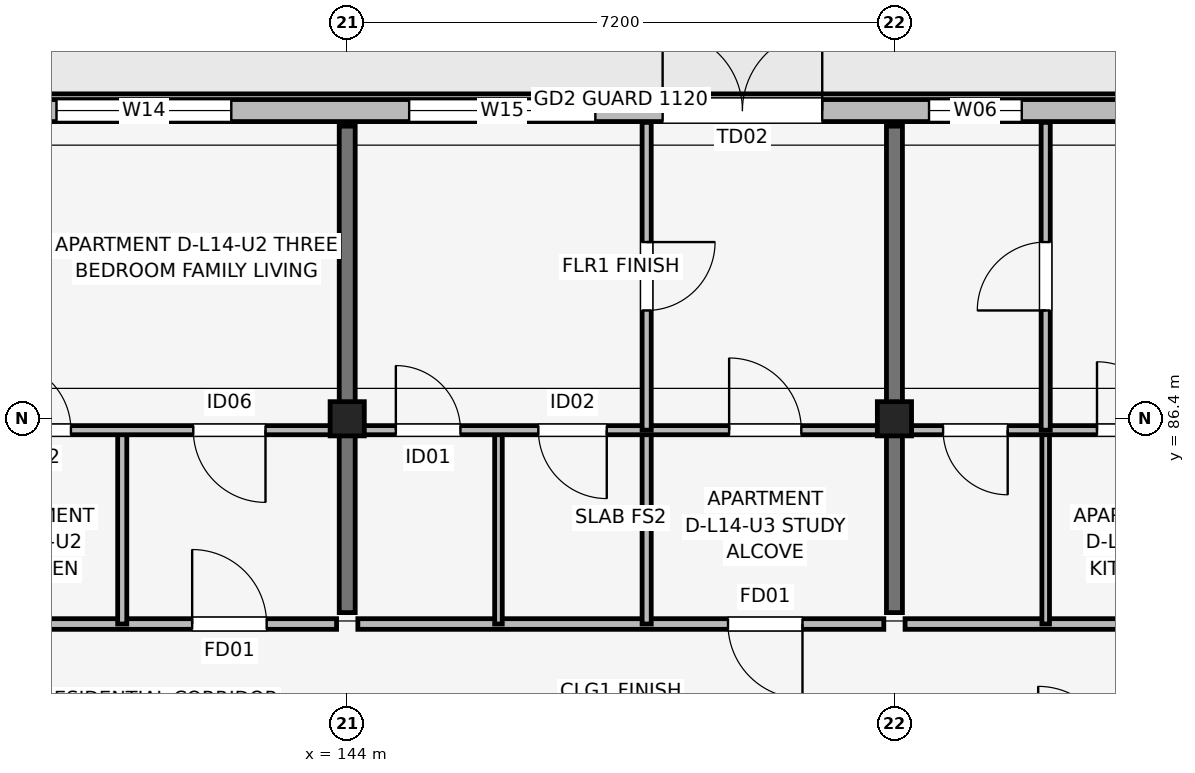
"""IFC4 building model, lengths in metres.
Left out: names, types, materials, properties, quantities, classifications, styles, units other than length and angle.
Written with IfcOpenShell. Run it as: python <this file> out.ifc"""

import sys

from ifc_helpers import new_model, si_unit, direction, frame, frame_2d, origin, origin_2d, place, context, subcontext, project, spatial, rectangle, extrude, element, fill, save


model = new_model("IFC4")
c1 = context("Model", 3, precision=1e-05, world=origin(), true_north=direction((0.0, 1.0)))
c2 = subcontext(c1, "Body", "Model", "MODEL_VIEW")
j1 = project(units=[si_unit("LENGTHUNIT", "METRE"), si_unit("PLANEANGLEUNIT", "RADIAN")], contexts=[c1])
p1 = place(None, origin())
s1 = spatial("IfcSite", under=j1, at=p1, CompositionType="ELEMENT")
p2 = place(p1, origin())
s2 = spatial("IfcBuilding", under=s1, at=p2, CompositionType="ELEMENT")
p3 = place(p2, frame((0.0, 0.0, 46.5)))
s3 = spatial("IfcBuildingStorey", under=s2, at=p3, CompositionType="ELEMENT", Elevation=46.5)
for number, where, z_axis, x_axis in (
    (1, (144.0, 86.4, 0.0), (0.0, 0.0, 1.0), (1.0, 0.0, 0.0)),
    (2, (151.2, 86.4, 0.0), (0.0, 0.0, 1.0), (1.0, 0.0, 0.0)),
):
    element("IfcColumn", number, at=place(p3, frame(where, z_axis=z_axis, x_axis=x_axis)), inside=s3, PredefinedType="COLUMN", context=c2, shape_type="SweptSolid", body=[
        extrude(rectangle(XDim=0.45, YDim=0.45, at=origin_2d()), origin(), (0.0, 0.0, 1.0), 3.15),
    ])
for number, where, z_axis, x_axis in (
    (3, (144.0, 83.85, 0.0), (0.0, 0.0, 1.0), (0.0, 1.0, 0.0)),
    (4, (151.2, 83.85, 0.0), (0.0, 0.0, 1.0), (0.0, 1.0, 0.0)),
):
    element("IfcWall", number, at=place(p3, frame(where, z_axis=z_axis, x_axis=x_axis)), inside=s3, PredefinedType="SHEAR", context=c2, shape_type="SweptSolid", body=[
        extrude(rectangle(XDim=6.4, YDim=0.21, at=frame_2d((3.2, 0.0))), origin(), (0.0, 0.0, 1.0), 3.15),
    ])
p4 = place(p3, frame((163.6, 90.455, 0.0), z_axis=(0.0, 0.0, 1.0), x_axis=(-1.0, 0.0, 0.0)))
e5 = element("IfcWall", 5, at=p4, inside=s3, PredefinedType="SOLIDWALL", context=c2, shape_type="SweptSolid", body=[
    extrude(rectangle(XDim=32.0, YDim=0.29, at=frame_2d((16.0, 0.0))), origin(), (0.0, 0.0, 1.0), 2.48),
])
p5 = place(p4, frame((15.45, 0.0, 0.0), z_axis=(0.0, 0.0, 1.0), x_axis=(-1.0, 0.0, 0.0)))
e6 = element("IfcOpeningElement", 6, at=p5, cuts=e5, PredefinedType="OPENING", context=c2, shape_type="SweptSolid", body=[
    extrude(rectangle(XDim=2.1, YDim=2.2, at=frame_2d((1.05, 1.1))), frame((0.0, 0.155, 0.0), z_axis=(0.0, -1.0, 0.0), x_axis=(1.0, 0.0, 0.0)), (0.0, 0.0, 1.0), 0.31),
])
p6 = place(p4, frame((29.285, 0.0, 0.7)))
e7 = element("IfcOpeningElement", 7, at=p6, cuts=e5, PredefinedType="OPENING", context=c2, shape_type="SweptSolid", body=[
    extrude(rectangle(XDim=1.86, YDim=1.6, at=frame_2d((0.93, 0.8))), frame((0.0, 0.155, 0.0), z_axis=(0.0, -1.0, 0.0), x_axis=(1.0, 0.0, 0.0)), (0.0, 0.0, 1.0), 0.31),
])
p7 = place(p4, frame((27.405, 0.0, 0.75)))
e8 = element("IfcOpeningElement", 8, at=p7, cuts=e5, PredefinedType="OPENING", context=c2, shape_type="SweptSolid", body=[
    extrude(rectangle(XDim=0.72, YDim=1.35, at=frame_2d((0.36, 0.675))), frame((0.0, 0.155, 0.0), z_axis=(0.0, -1.0, 0.0), x_axis=(1.0, 0.0, 0.0)), (0.0, 0.0, 1.0), 0.31),
])
p8 = place(p4, frame((25.31, 0.0, 0.75)))
e9 = element("IfcOpeningElement", 9, at=p8, cuts=e5, PredefinedType="OPENING", context=c2, shape_type="SweptSolid", body=[
    extrude(rectangle(XDim=0.85, YDim=1.4, at=frame_2d((0.425, 0.7))), frame((0.0, 0.155, 0.0), z_axis=(0.0, -1.0, 0.0), x_axis=(1.0, 0.0, 0.0)), (0.0, 0.0, 1.0), 0.31),
])
p9 = place(p4, frame((21.125, 0.0, 0.7)))
e10 = element("IfcOpeningElement", 10, at=p9, cuts=e5, PredefinedType="OPENING", context=c2, shape_type="SweptSolid", body=[
    extrude(rectangle(XDim=2.3, YDim=1.65, at=frame_2d((1.15, 0.825))), frame((0.0, 0.155, 0.0), z_axis=(0.0, -1.0, 0.0), x_axis=(1.0, 0.0, 0.0)), (0.0, 0.0, 1.0), 0.31),
])
p10 = place(p4, frame((16.335, 0.0, 0.7)))
e11 = element("IfcOpeningElement", 11, at=p10, cuts=e5, PredefinedType="OPENING", context=c2, shape_type="SweptSolid", body=[
    extrude(rectangle(XDim=2.45, YDim=1.65, at=frame_2d((1.225, 0.825))), frame((0.0, 0.155, 0.0), z_axis=(0.0, -1.0, 0.0), x_axis=(1.0, 0.0, 0.0)), (0.0, 0.0, 1.0), 0.31),
])
p11 = place(p4, frame((10.725, 0.0, 0.75)))
e12 = element("IfcOpeningElement", 12, at=p11, cuts=e5, PredefinedType="OPENING", context=c2, shape_type="SweptSolid", body=[
    extrude(rectangle(XDim=1.22, YDim=1.5, at=frame_2d((0.61, 0.75))), frame((0.0, 0.155, 0.0), z_axis=(0.0, -1.0, 0.0), x_axis=(1.0, 0.0, 0.0)), (0.0, 0.0, 1.0), 0.31),
])
p12 = place(p4, frame((7.015, 0.0, 0.7)))
e13 = element("IfcOpeningElement", 13, at=p12, cuts=e5, PredefinedType="OPENING", context=c2, shape_type="SweptSolid", body=[
    extrude(rectangle(XDim=1.72, YDim=1.6, at=frame_2d((0.86, 0.8))), frame((0.0, 0.155, 0.0), z_axis=(0.0, -1.0, 0.0), x_axis=(1.0, 0.0, 0.0)), (0.0, 0.0, 1.0), 0.31),
])
p13 = place(p4, frame((3.375, 0.0, 0.75)))
e14 = element("IfcOpeningElement", 14, at=p13, cuts=e5, PredefinedType="OPENING", context=c2, shape_type="SweptSolid", body=[
    extrude(rectangle(XDim=1.46, YDim=1.55, at=frame_2d((0.73, 0.775))), frame((0.0, 0.155, 0.0), z_axis=(0.0, -1.0, 0.0), x_axis=(1.0, 0.0, 0.0)), (0.0, 0.0, 1.0), 0.31),
])
p14 = place(p4, frame((1.355, 0.0, 0.75)))
e15 = element("IfcOpeningElement", 15, at=p14, cuts=e5, PredefinedType="OPENING", context=c2, shape_type="SweptSolid", body=[
    extrude(rectangle(XDim=0.6, YDim=1.25, at=frame_2d((0.3, 0.625))), frame((0.0, 0.155, 0.0), z_axis=(0.0, -1.0, 0.0), x_axis=(1.0, 0.0, 0.0)), (0.0, 0.0, 1.0), 0.31),
])
p15 = place(p3, frame((136.94, 83.7, 0.0), z_axis=(0.0, 0.0, 1.0), x_axis=(1.0, 0.0, 0.0)))
e16 = element("IfcWall", 16, at=p15, inside=s3, PredefinedType="PARTITIONING", context=c2, shape_type="SweptSolid", body=[
    extrude(rectangle(XDim=6.92, YDim=0.14, at=frame_2d((3.46, 0.0))), origin(), (0.0, 0.0, 1.0), 2.38),
])
p16 = place(p15, frame((5.02, 0.0, 0.0)))
e17 = element("IfcOpeningElement", 17, at=p16, cuts=e16, PredefinedType="OPENING", context=c2, shape_type="SweptSolid", body=[
    extrude(rectangle(XDim=0.98, YDim=2.1, at=frame_2d((0.49, 1.05))), frame((0.0, 0.08, 0.0), z_axis=(0.0, -1.0, 0.0), x_axis=(1.0, 0.0, 0.0)), (0.0, 0.0, 1.0), 0.16),
])
p17 = place(p3, frame((141.04, 83.7, 0.0), z_axis=(0.0, 0.0, 1.0), x_axis=(0.0, 1.0, 0.0)))
e18 = element("IfcWall", 18, at=p17, inside=s3, PredefinedType="PARTITIONING", context=c2, shape_type="SweptSolid", body=[
    extrude(rectangle(XDim=2.55, YDim=0.12, at=frame_2d((1.275, 0.0))), origin(), (0.0, 0.0, 1.0), 2.38),
])
p18 = place(p3, frame((136.94, 86.25, 0.0), z_axis=(0.0, 0.0, 1.0), x_axis=(1.0, 0.0, 0.0)))
e19 = element("IfcWall", 19, at=p18, inside=s3, PredefinedType="PARTITIONING", context=c2, shape_type="SweptSolid", body=[
    extrude(rectangle(XDim=6.92, YDim=0.12, at=frame_2d((3.46, 0.0))), origin(), (0.0, 0.0, 1.0), 2.38),
])
p19 = place(p18, frame((1.35, 0.0, 0.0), z_axis=(0.0, 0.0, 1.0), x_axis=(-1.0, 0.0, 0.0)))
e20 = element("IfcOpeningElement", 20, at=p19, cuts=e19, PredefinedType="OPENING", context=c2, shape_type="SweptSolid", body=[
    extrude(rectangle(XDim=0.85, YDim=2.08, at=frame_2d((0.425, 1.04))), frame((0.0, 0.07, 0.0), z_axis=(0.0, -1.0, 0.0), x_axis=(1.0, 0.0, 0.0)), (0.0, 0.0, 1.0), 0.14),
])
p20 = place(p18, frame((2.525, 0.0, 0.0)))
e21 = element("IfcOpeningElement", 21, at=p20, cuts=e19, PredefinedType="OPENING", context=c2, shape_type="SweptSolid", body=[
    extrude(rectangle(XDim=0.9, YDim=2.08, at=frame_2d((0.45, 1.04))), frame((0.0, 0.07, 0.0), z_axis=(0.0, -1.0, 0.0), x_axis=(1.0, 0.0, 0.0)), (0.0, 0.0, 1.0), 0.14),
])
p21 = place(p18, frame((5.985, 0.0, 0.0), z_axis=(0.0, 0.0, 1.0), x_axis=(-1.0, 0.0, 0.0)))
e22 = element("IfcOpeningElement", 22, at=p21, cuts=e19, PredefinedType="OPENING", context=c2, shape_type="SweptSolid", body=[
    extrude(rectangle(XDim=0.95, YDim=2.08, at=frame_2d((0.475, 1.04))), frame((0.0, 0.07, 0.0), z_axis=(0.0, -1.0, 0.0), x_axis=(1.0, 0.0, 0.0)), (0.0, 0.0, 1.0), 0.14),
])
p22 = place(p3, frame((144.14, 83.7, 0.0), z_axis=(0.0, 0.0, 1.0), x_axis=(1.0, 0.0, 0.0)))
e23 = element("IfcWall", 23, at=p22, inside=s3, PredefinedType="PARTITIONING", context=c2, shape_type="SweptSolid", body=[
    extrude(rectangle(XDim=6.92, YDim=0.14, at=frame_2d((3.46, 0.0))), origin(), (0.0, 0.0, 1.0), 2.38),
])
p23 = place(p22, frame((5.85, 0.0, 0.0), z_axis=(0.0, 0.0, 1.0), x_axis=(-1.0, 0.0, 0.0)))
e24 = element("IfcOpeningElement", 24, at=p23, cuts=e23, PredefinedType="OPENING", context=c2, shape_type="SweptSolid", body=[
    extrude(rectangle(XDim=0.98, YDim=2.1, at=frame_2d((0.49, 1.05))), frame((0.0, 0.08, 0.0), z_axis=(0.0, -1.0, 0.0), x_axis=(1.0, 0.0, 0.0)), (0.0, 0.0, 1.0), 0.16),
])
p24 = place(p3, frame((145.99, 83.7, 0.0), z_axis=(0.0, 0.0, 1.0), x_axis=(0.0, 1.0, 0.0)))
e25 = element("IfcWall", 25, at=p24, inside=s3, PredefinedType="PARTITIONING", context=c2, shape_type="SweptSolid", body=[
    extrude(rectangle(XDim=2.55, YDim=0.1, at=frame_2d((1.275, 0.0))), origin(), (0.0, 0.0, 1.0), 2.38),
])
p25 = place(p3, frame((147.94, 83.7, 0.0), z_axis=(0.0, 0.0, 1.0), x_axis=(0.0, 1.0, 0.0)))
e26 = element("IfcWall", 26, at=p25, inside=s3, PredefinedType="PARTITIONING", context=c2, shape_type="SweptSolid", body=[
    extrude(rectangle(XDim=2.55, YDim=0.12, at=frame_2d((1.275, 0.0))), origin(), (0.0, 0.0, 1.0), 2.38),
])
p26 = place(p3, frame((144.14, 86.25, 0.0), z_axis=(0.0, 0.0, 1.0), x_axis=(1.0, 0.0, 0.0)))
e27 = element("IfcWall", 27, at=p26, inside=s3, PredefinedType="PARTITIONING", context=c2, shape_type="SweptSolid", body=[
    extrude(rectangle(XDim=6.92, YDim=0.12, at=frame_2d((3.46, 0.0))), origin(), (0.0, 0.0, 1.0), 2.38),
])
p27 = place(p26, frame((0.5, 0.0, 0.0)))
e28 = element("IfcOpeningElement", 28, at=p27, cuts=e27, PredefinedType="OPENING", context=c2, shape_type="SweptSolid", body=[
    extrude(rectangle(XDim=0.85, YDim=2.08, at=frame_2d((0.425, 1.04))), frame((0.0, 0.07, 0.0), z_axis=(0.0, -1.0, 0.0), x_axis=(1.0, 0.0, 0.0)), (0.0, 0.0, 1.0), 0.14),
])
p28 = place(p26, frame((3.275, 0.0, 0.0), z_axis=(0.0, 0.0, 1.0), x_axis=(-1.0, 0.0, 0.0)))
e29 = element("IfcOpeningElement", 29, at=p28, cuts=e27, PredefinedType="OPENING", context=c2, shape_type="SweptSolid", body=[
    extrude(rectangle(XDim=0.9, YDim=2.08, at=frame_2d((0.45, 1.04))), frame((0.0, 0.07, 0.0), z_axis=(0.0, -1.0, 0.0), x_axis=(1.0, 0.0, 0.0)), (0.0, 0.0, 1.0), 0.14),
])
p29 = place(p26, frame((4.885, 0.0, 0.0)))
e30 = element("IfcOpeningElement", 30, at=p29, cuts=e27, PredefinedType="OPENING", context=c2, shape_type="SweptSolid", body=[
    extrude(rectangle(XDim=0.95, YDim=2.08, at=frame_2d((0.475, 1.04))), frame((0.0, 0.07, 0.0), z_axis=(0.0, -1.0, 0.0), x_axis=(1.0, 0.0, 0.0)), (0.0, 0.0, 1.0), 0.14),
])
p30 = place(p3, frame((147.94, 86.25, 0.0), z_axis=(0.0, 0.0, 1.0), x_axis=(0.0, 1.0, 0.0)))
e31 = element("IfcWall", 31, at=p30, inside=s3, PredefinedType="PARTITIONING", context=c2, shape_type="SweptSolid", body=[
    extrude(rectangle(XDim=4.05, YDim=0.12, at=frame_2d((2.025, 0.0))), origin(), (0.0, 0.0, 1.0), 2.38),
])
p31 = place(p30, frame((2.475, 0.0, 0.0), z_axis=(0.0, 0.0, 1.0), x_axis=(-1.0, 0.0, 0.0)))
e32 = element("IfcOpeningElement", 32, at=p31, cuts=e31, PredefinedType="OPENING", context=c2, shape_type="SweptSolid", body=[
    extrude(rectangle(XDim=0.9, YDim=2.08, at=frame_2d((0.45, 1.04))), frame((0.0, 0.07, 0.0), z_axis=(0.0, -1.0, 0.0), x_axis=(1.0, 0.0, 0.0)), (0.0, 0.0, 1.0), 0.14),
])
p32 = place(p3, frame((151.34, 83.7, 0.0), z_axis=(0.0, 0.0, 1.0), x_axis=(1.0, 0.0, 0.0)))
e33 = element("IfcWall", 33, at=p32, inside=s3, PredefinedType="PARTITIONING", context=c2, shape_type="SweptSolid", body=[
    extrude(rectangle(XDim=6.92, YDim=0.14, at=frame_2d((3.46, 0.0))), origin(), (0.0, 0.0, 1.0), 2.38),
])
p33 = place(p32, frame((5.02, 0.0, 0.0)))
e34 = element("IfcOpeningElement", 34, at=p33, cuts=e33, PredefinedType="OPENING", context=c2, shape_type="SweptSolid", body=[
    extrude(rectangle(XDim=0.98, YDim=2.1, at=frame_2d((0.49, 1.05))), frame((0.0, 0.08, 0.0), z_axis=(0.0, -1.0, 0.0), x_axis=(1.0, 0.0, 0.0)), (0.0, 0.0, 1.0), 0.16),
])
p34 = place(p3, frame((153.19, 83.7, 0.0), z_axis=(0.0, 0.0, 1.0), x_axis=(0.0, 1.0, 0.0)))
e35 = element("IfcWall", 35, at=p34, inside=s3, PredefinedType="PARTITIONING", context=c2, shape_type="SweptSolid", body=[
    extrude(rectangle(XDim=2.55, YDim=0.1, at=frame_2d((1.275, 0.0))), origin(), (0.0, 0.0, 1.0), 2.38),
])
p35 = place(p3, frame((151.34, 86.25, 0.0), z_axis=(0.0, 0.0, 1.0), x_axis=(1.0, 0.0, 0.0)))
e36 = element("IfcWall", 36, at=p35, inside=s3, PredefinedType="PARTITIONING", context=c2, shape_type="SweptSolid", body=[
    extrude(rectangle(XDim=6.92, YDim=0.12, at=frame_2d((3.46, 0.0))), origin(), (0.0, 0.0, 1.0), 2.38),
])
p36 = place(p35, frame((1.35, 0.0, 0.0), z_axis=(0.0, 0.0, 1.0), x_axis=(-1.0, 0.0, 0.0)))
e37 = element("IfcOpeningElement", 37, at=p36, cuts=e36, PredefinedType="OPENING", context=c2, shape_type="SweptSolid", body=[
    extrude(rectangle(XDim=0.85, YDim=2.08, at=frame_2d((0.425, 1.04))), frame((0.0, 0.07, 0.0), z_axis=(0.0, -1.0, 0.0), x_axis=(1.0, 0.0, 0.0)), (0.0, 0.0, 1.0), 0.14),
])
p37 = place(p35, frame((2.525, 0.0, 0.0)))
e38 = element("IfcOpeningElement", 38, at=p37, cuts=e36, PredefinedType="OPENING", context=c2, shape_type="SweptSolid", body=[
    extrude(rectangle(XDim=0.9, YDim=2.08, at=frame_2d((0.45, 1.04))), frame((0.0, 0.07, 0.0), z_axis=(0.0, -1.0, 0.0), x_axis=(1.0, 0.0, 0.0)), (0.0, 0.0, 1.0), 0.14),
])
p38 = place(p35, frame((5.985, 0.0, 0.0), z_axis=(0.0, 0.0, 1.0), x_axis=(-1.0, 0.0, 0.0)))
e39 = element("IfcOpeningElement", 39, at=p38, cuts=e36, PredefinedType="OPENING", context=c2, shape_type="SweptSolid", body=[
    extrude(rectangle(XDim=0.95, YDim=2.08, at=frame_2d((0.475, 1.04))), frame((0.0, 0.07, 0.0), z_axis=(0.0, -1.0, 0.0), x_axis=(1.0, 0.0, 0.0)), (0.0, 0.0, 1.0), 0.14),
])
p39 = place(p3, frame((153.19, 86.25, 0.0), z_axis=(0.0, 0.0, 1.0), x_axis=(0.0, 1.0, 0.0)))
e40 = element("IfcWall", 40, at=p39, inside=s3, PredefinedType="PARTITIONING", context=c2, shape_type="SweptSolid", body=[
    extrude(rectangle(XDim=4.05, YDim=0.12, at=frame_2d((2.025, 0.0))), origin(), (0.0, 0.0, 1.0), 2.38),
])
p40 = place(p39, frame((1.575, 0.0, 0.0)))
e41 = element("IfcOpeningElement", 41, at=p40, cuts=e40, PredefinedType="OPENING", context=c2, shape_type="SweptSolid", body=[
    extrude(rectangle(XDim=0.9, YDim=2.08, at=frame_2d((0.45, 1.04))), frame((0.0, 0.07, 0.0), z_axis=(0.0, -1.0, 0.0), x_axis=(1.0, 0.0, 0.0)), (0.0, 0.0, 1.0), 0.14),
])
p41 = place(p5, origin())
e42 = element("IfcDoor", 42, at=p41, inside=s3, OperationType="DOUBLE_DOOR_SINGLE_SWING", PredefinedType="DOOR", context=c2, shape_type="SweptSolid", body=[
    extrude(rectangle(XDim=2.1, YDim=2.2, at=frame_2d((1.05, 1.1))), frame((0.0, 0.025, 0.0), z_axis=(0.0, -1.0, 0.0), x_axis=(1.0, 0.0, 0.0)), (0.0, 0.0, 1.0), 0.05),
])
fill(e6, e42)
p42 = place(p9, origin())
e43 = element("IfcWindow", 43, at=p42, inside=s3, PartitioningType="SINGLE_PANEL", PredefinedType="WINDOW", context=c2, shape_type="SweptSolid", body=[
    extrude(rectangle(XDim=2.3, YDim=1.65, at=frame_2d((1.15, 0.825))), frame((0.0, 0.03, 0.0), z_axis=(0.0, -1.0, 0.0), x_axis=(1.0, 0.0, 0.0)), (0.0, 0.0, 1.0), 0.06),
])
fill(e10, e43)
p43 = place(p10, origin())
e44 = element("IfcWindow", 44, at=p43, inside=s3, PartitioningType="SINGLE_PANEL", PredefinedType="WINDOW", context=c2, shape_type="SweptSolid", body=[
    extrude(rectangle(XDim=2.45, YDim=1.65, at=frame_2d((1.225, 0.825))), frame((0.0, 0.03, 0.0), z_axis=(0.0, -1.0, 0.0), x_axis=(1.0, 0.0, 0.0)), (0.0, 0.0, 1.0), 0.06),
])
fill(e11, e44)
p44 = place(p11, origin())
e45 = element("IfcWindow", 45, at=p44, inside=s3, PartitioningType="SINGLE_PANEL", PredefinedType="WINDOW", context=c2, shape_type="SweptSolid", body=[
    extrude(rectangle(XDim=1.22, YDim=1.5, at=frame_2d((0.61, 0.75))), frame((0.0, 0.03, 0.0), z_axis=(0.0, -1.0, 0.0), x_axis=(1.0, 0.0, 0.0)), (0.0, 0.0, 1.0), 0.06),
])
fill(e12, e45)
p45 = place(p16, origin())
e46 = element("IfcDoor", 46, at=p45, inside=s3, OperationType="SINGLE_SWING_LEFT", PredefinedType="DOOR", context=c2, shape_type="SweptSolid", body=[
    extrude(rectangle(XDim=0.98, YDim=2.1, at=frame_2d((0.49, 1.05))), frame((0.0, 0.025, 0.0), z_axis=(0.0, -1.0, 0.0), x_axis=(1.0, 0.0, 0.0)), (0.0, 0.0, 1.0), 0.05),
])
fill(e17, e46)
p46 = place(p20, origin())
e47 = element("IfcDoor", 47, at=p46, inside=s3, OperationType="SINGLE_SWING_LEFT", PredefinedType="DOOR", context=c2, shape_type="SweptSolid", body=[
    extrude(rectangle(XDim=0.9, YDim=2.08, at=frame_2d((0.45, 1.04))), frame((0.0, 0.025, 0.0), z_axis=(0.0, -1.0, 0.0), x_axis=(1.0, 0.0, 0.0)), (0.0, 0.0, 1.0), 0.05),
])
fill(e21, e47)
p47 = place(p21, origin())
e48 = element("IfcDoor", 48, at=p47, inside=s3, OperationType="SINGLE_SWING_RIGHT", PredefinedType="DOOR", context=c2, shape_type="SweptSolid", body=[
    extrude(rectangle(XDim=0.95, YDim=2.08, at=frame_2d((0.475, 1.04))), frame((0.0, 0.025, 0.0), z_axis=(0.0, -1.0, 0.0), x_axis=(1.0, 0.0, 0.0)), (0.0, 0.0, 1.0), 0.05),
])
fill(e22, e48)
p48 = place(p23, origin())
e49 = element("IfcDoor", 49, at=p48, inside=s3, OperationType="SINGLE_SWING_RIGHT", PredefinedType="DOOR", context=c2, shape_type="SweptSolid", body=[
    extrude(rectangle(XDim=0.98, YDim=2.1, at=frame_2d((0.49, 1.05))), frame((0.0, 0.025, 0.0), z_axis=(0.0, -1.0, 0.0), x_axis=(1.0, 0.0, 0.0)), (0.0, 0.0, 1.0), 0.05),
])
fill(e24, e49)
p49 = place(p27, origin())
e50 = element("IfcDoor", 50, at=p49, inside=s3, OperationType="SINGLE_SWING_LEFT", PredefinedType="DOOR", context=c2, shape_type="SweptSolid", body=[
    extrude(rectangle(XDim=0.85, YDim=2.08, at=frame_2d((0.425, 1.04))), frame((0.0, 0.025, 0.0), z_axis=(0.0, -1.0, 0.0), x_axis=(1.0, 0.0, 0.0)), (0.0, 0.0, 1.0), 0.05),
])
fill(e28, e50)
p50 = place(p28, origin())
e51 = element("IfcDoor", 51, at=p50, inside=s3, OperationType="SINGLE_SWING_RIGHT", PredefinedType="DOOR", context=c2, shape_type="SweptSolid", body=[
    extrude(rectangle(XDim=0.9, YDim=2.08, at=frame_2d((0.45, 1.04))), frame((0.0, 0.025, 0.0), z_axis=(0.0, -1.0, 0.0), x_axis=(1.0, 0.0, 0.0)), (0.0, 0.0, 1.0), 0.05),
])
fill(e29, e51)
p51 = place(p29, origin())
e52 = element("IfcDoor", 52, at=p51, inside=s3, OperationType="SINGLE_SWING_LEFT", PredefinedType="DOOR", context=c2, shape_type="SweptSolid", body=[
    extrude(rectangle(XDim=0.95, YDim=2.08, at=frame_2d((0.475, 1.04))), frame((0.0, 0.025, 0.0), z_axis=(0.0, -1.0, 0.0), x_axis=(1.0, 0.0, 0.0)), (0.0, 0.0, 1.0), 0.05),
])
fill(e30, e52)
p52 = place(p31, origin())
e53 = element("IfcDoor", 53, at=p52, inside=s3, OperationType="SINGLE_SWING_RIGHT", PredefinedType="DOOR", context=c2, shape_type="SweptSolid", body=[
    extrude(rectangle(XDim=0.9, YDim=2.08, at=frame_2d((0.45, 1.04))), frame((0.0, 0.025, 0.0), z_axis=(0.0, -1.0, 0.0), x_axis=(1.0, 0.0, 0.0)), (0.0, 0.0, 1.0), 0.05),
])
fill(e32, e53)
p53 = place(p36, origin())
e54 = element("IfcDoor", 54, at=p53, inside=s3, OperationType="SINGLE_SWING_RIGHT", PredefinedType="DOOR", context=c2, shape_type="SweptSolid", body=[
    extrude(rectangle(XDim=0.85, YDim=2.08, at=frame_2d((0.425, 1.04))), frame((0.0, 0.025, 0.0), z_axis=(0.0, -1.0, 0.0), x_axis=(1.0, 0.0, 0.0)), (0.0, 0.0, 1.0), 0.05),
])
fill(e37, e54)
p54 = place(p37, origin())
e55 = element("IfcDoor", 55, at=p54, inside=s3, OperationType="SINGLE_SWING_LEFT", PredefinedType="DOOR", context=c2, shape_type="SweptSolid", body=[
    extrude(rectangle(XDim=0.9, YDim=2.08, at=frame_2d((0.45, 1.04))), frame((0.0, 0.025, 0.0), z_axis=(0.0, -1.0, 0.0), x_axis=(1.0, 0.0, 0.0)), (0.0, 0.0, 1.0), 0.05),
])
fill(e38, e55)
p55 = place(p40, origin())
e56 = element("IfcDoor", 56, at=p55, inside=s3, OperationType="SINGLE_SWING_LEFT", PredefinedType="DOOR", context=c2, shape_type="SweptSolid", body=[
    extrude(rectangle(XDim=0.9, YDim=2.08, at=frame_2d((0.45, 1.04))), frame((0.0, 0.025, 0.0), z_axis=(0.0, -1.0, 0.0), x_axis=(1.0, 0.0, 0.0)), (0.0, 0.0, 1.0), 0.05),
])
fill(e41, e56)
save(model, sys.argv[1])
